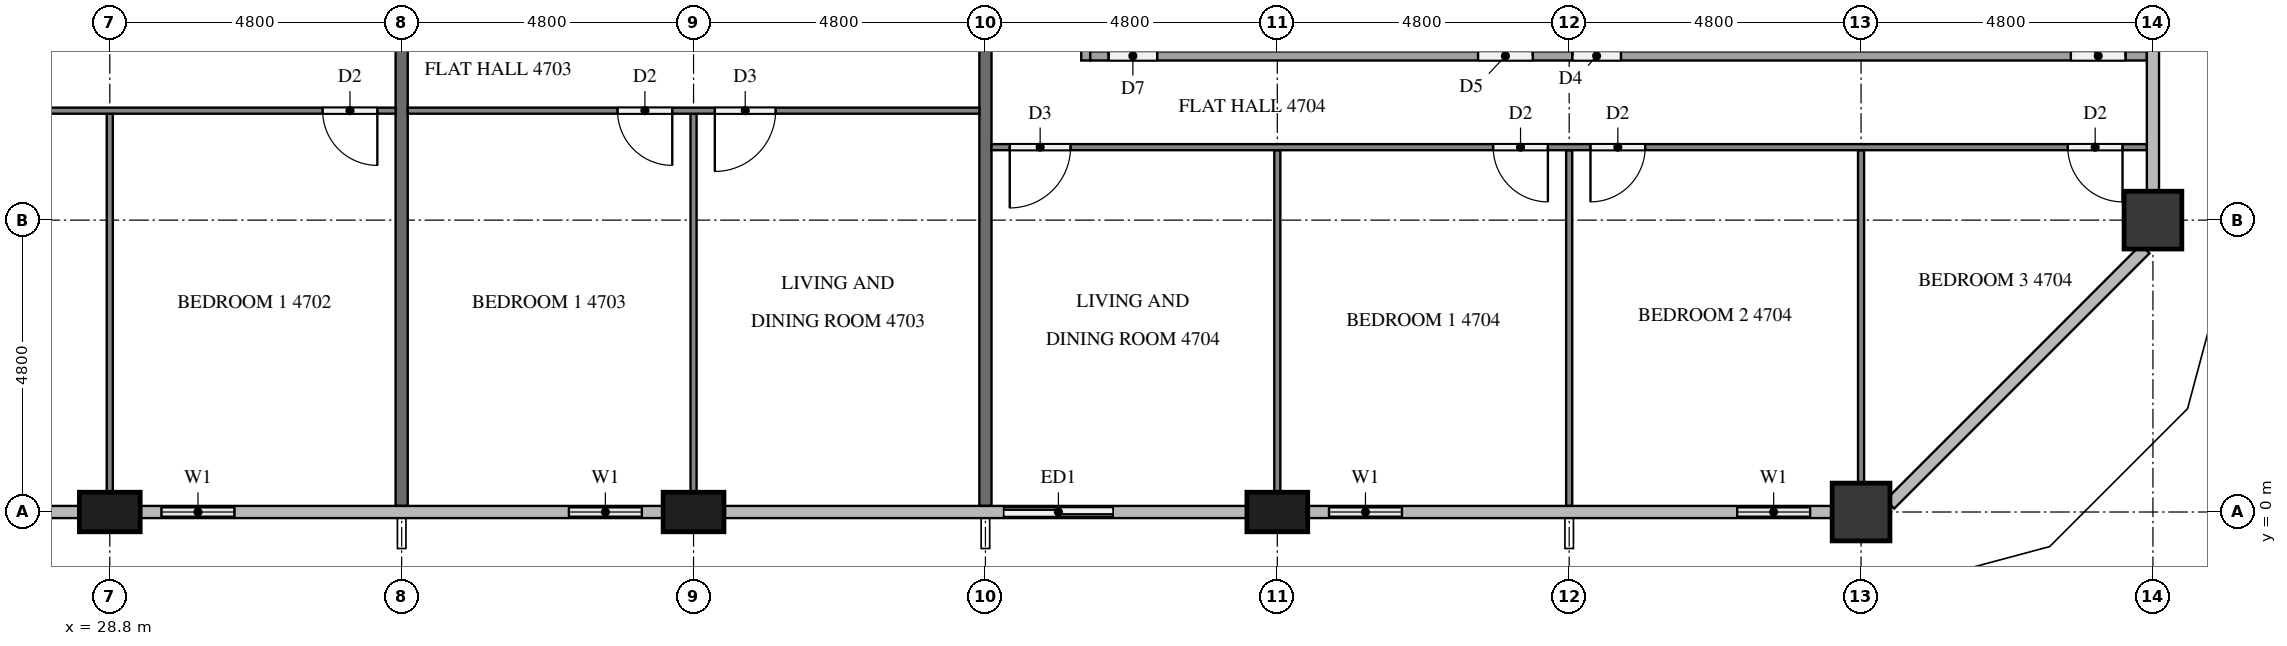
"""IFC4 building model, lengths in metres.
Left out: names, types, materials, properties, quantities, classifications, styles, units other than length and angle.
Written with IfcOpenShell. Run it as: python <this file> out.ifc"""

import sys

from ifc_helpers import new_model, si_unit, direction, frame, frame_2d, origin, origin_2d, place, context, subcontext, project, spatial, rectangle, extrude, element, fill, save


model = new_model("IFC4")
c1 = context("Model", 3, precision=1e-05, world=origin(), true_north=direction((0.0, 1.0)))
c2 = subcontext(c1, "Body", "Model", "MODEL_VIEW")
j1 = project(units=[si_unit("LENGTHUNIT", "METRE"), si_unit("PLANEANGLEUNIT", "RADIAN")], contexts=[c1])
p1 = place(None, origin())
s1 = spatial("IfcSite", under=j1, at=p1, CompositionType="ELEMENT")
p2 = place(p1, origin())
s2 = spatial("IfcBuilding", under=s1, at=p2, CompositionType="ELEMENT")
p3 = place(p2, frame((0.0, 0.0, 182.4)))
s3 = spatial("IfcBuildingStorey", under=s2, at=p3, CompositionType="ELEMENT", Elevation=182.4)
for number, where, z_axis, x_axis in (
    (1, (28.8, 0.0, 0.0), (0.0, 0.0, 1.0), (1.0, 0.0, 0.0)),
    (2, (38.4, 0.0, 0.0), (0.0, 0.0, 1.0), (1.0, 0.0, 0.0)),
    (3, (48.0, 0.0, 0.0), (0.0, 0.0, 1.0), (1.0, 0.0, 0.0)),
):
    element("IfcColumn", number, at=place(p3, frame(where, z_axis=z_axis, x_axis=x_axis)), inside=s3, PredefinedType="COLUMN", context=c2, shape_type="SweptSolid", body=[
        extrude(rectangle(XDim=1.0, YDim=0.65, at=origin_2d()), origin(), (0.0, 0.0, 1.0), 3.2),
    ])
for number, where, z_axis, x_axis in (
    (4, (57.6, 0.0, 0.0), (0.0, 0.0, 1.0), (1.0, 0.0, 0.0)),
    (5, (62.4, 4.8, 0.0), (0.0, 0.0, 1.0), (1.0, 0.0, 0.0)),
):
    element("IfcColumn", number, at=place(p3, frame(where, z_axis=z_axis, x_axis=x_axis)), inside=s3, PredefinedType="COLUMN", context=c2, shape_type="SweptSolid", body=[
        extrude(rectangle(XDim=0.95, YDim=0.95, at=origin_2d()), origin(), (0.0, 0.0, 1.0), 3.2),
    ])
p4 = place(p3, frame((29.3, 0.0, 0.0), z_axis=(0.0, 0.0, 1.0), x_axis=(1.0, 0.0, 0.0)))
e6 = element("IfcWall", 6, at=p4, inside=s3, PredefinedType="SOLIDWALL", context=c2, shape_type="SweptSolid", body=[
    extrude(rectangle(XDim=1.9, YDim=0.15, at=frame_2d((0.95, 0.0))), origin(), (0.0, 0.0, 1.0), 3.2),
])
p5 = place(p4, frame((0.35, 0.0, 0.9)))
e7 = element("IfcOpeningElement", 7, at=p5, cuts=e6, PredefinedType="OPENING", context=c2, shape_type="SweptSolid", body=[
    extrude(rectangle(XDim=1.2, YDim=1.4, at=frame_2d((0.6, 0.7))), frame((0.0, 0.085, 0.0), z_axis=(0.0, -1.0, 0.0), x_axis=(1.0, 0.0, 0.0)), (0.0, 0.0, 1.0), 0.17),
])
p6 = place(p3, frame((36.0, 0.0, 0.0), z_axis=(0.0, 0.0, 1.0), x_axis=(1.0, 0.0, 0.0)))
e8 = element("IfcWall", 8, at=p6, inside=s3, PredefinedType="SOLIDWALL", context=c2, shape_type="SweptSolid", body=[
    extrude(rectangle(XDim=1.9, YDim=0.15, at=frame_2d((0.95, 0.0))), origin(), (0.0, 0.0, 1.0), 3.2),
])
p7 = place(p6, frame((0.35, 0.0, 0.9)))
e9 = element("IfcOpeningElement", 9, at=p7, cuts=e8, PredefinedType="OPENING", context=c2, shape_type="SweptSolid", body=[
    extrude(rectangle(XDim=1.2, YDim=1.4, at=frame_2d((0.6, 0.7))), frame((0.0, 0.085, 0.0), z_axis=(0.0, -1.0, 0.0), x_axis=(1.0, 0.0, 0.0)), (0.0, 0.0, 1.0), 0.17),
])
p8 = place(p3, frame((43.2, 0.0, 0.0), z_axis=(0.0, 0.0, 1.0), x_axis=(1.0, 0.0, 0.0)))
e10 = element("IfcWall", 10, at=p8, inside=s3, PredefinedType="SOLIDWALL", context=c2, shape_type="SweptSolid", body=[
    extrude(rectangle(XDim=2.4, YDim=0.15, at=frame_2d((1.2, 0.0))), origin(), (0.0, 0.0, 1.0), 3.2),
])
p9 = place(p8, frame((0.3, 0.0, 0.0)))
e11 = element("IfcOpeningElement", 11, at=p9, cuts=e10, PredefinedType="OPENING", context=c2, shape_type="SweptSolid", body=[
    extrude(rectangle(XDim=1.8, YDim=2.4, at=frame_2d((0.9, 1.2))), frame((0.0, 0.085, 0.0), z_axis=(0.0, -1.0, 0.0), x_axis=(1.0, 0.0, 0.0)), (0.0, 0.0, 1.0), 0.17),
])
p10 = place(p3, frame((48.5, 0.0, 0.0), z_axis=(0.0, 0.0, 1.0), x_axis=(1.0, 0.0, 0.0)))
e12 = element("IfcWall", 12, at=p10, inside=s3, PredefinedType="SOLIDWALL", context=c2, shape_type="SweptSolid", body=[
    extrude(rectangle(XDim=1.9, YDim=0.15, at=frame_2d((0.95, 0.0))), origin(), (0.0, 0.0, 1.0), 3.2),
])
p11 = place(p10, frame((0.35, 0.0, 0.9)))
e13 = element("IfcOpeningElement", 13, at=p11, cuts=e12, PredefinedType="OPENING", context=c2, shape_type="SweptSolid", body=[
    extrude(rectangle(XDim=1.2, YDim=1.4, at=frame_2d((0.6, 0.7))), frame((0.0, 0.085, 0.0), z_axis=(0.0, -1.0, 0.0), x_axis=(1.0, 0.0, 0.0)), (0.0, 0.0, 1.0), 0.17),
])
p12 = place(p3, frame((55.2, 0.0, 0.0), z_axis=(0.0, 0.0, 1.0), x_axis=(1.0, 0.0, 0.0)))
e14 = element("IfcWall", 14, at=p12, inside=s3, PredefinedType="SOLIDWALL", context=c2, shape_type="SweptSolid", body=[
    extrude(rectangle(XDim=1.925, YDim=0.15, at=frame_2d((0.962, 0.0))), origin(), (0.0, 0.0, 1.0), 3.2),
])
p13 = place(p12, frame((0.363, 0.0, 0.9)))
e15 = element("IfcOpeningElement", 15, at=p13, cuts=e14, PredefinedType="OPENING", context=c2, shape_type="SweptSolid", body=[
    extrude(rectangle(XDim=1.2, YDim=1.4, at=frame_2d((0.6, 0.7))), frame((0.0, 0.085, 0.0), z_axis=(0.0, -1.0, 0.0), x_axis=(1.0, 0.0, 0.0)), (0.0, 0.0, 1.0), 0.17),
])
for number, where, z_axis, x_axis in (
    (16, (33.6, 11.9, 0.0), (0.0, 0.0, 1.0), (0.0, -1.0, 0.0)),
    (17, (43.2, 11.9, 0.0), (0.0, 0.0, 1.0), (0.0, -1.0, 0.0)),
):
    element("IfcWall", number, at=place(p3, frame(where, z_axis=z_axis, x_axis=x_axis)), inside=s3, PredefinedType="PARTITIONING", context=c2, shape_type="SweptSolid", body=[
        extrude(rectangle(XDim=11.8, YDim=0.2, at=frame_2d((5.9, 0.0))), origin(), (0.0, 0.0, 1.0), 3.2),
    ])
p14 = place(p3, frame((28.8, 6.55, 0.0), z_axis=(0.0, 0.0, 1.0), x_axis=(0.0, -1.0, 0.0)))
e18 = element("IfcWall", 18, at=p14, inside=s3, PredefinedType="PARTITIONING", context=c2, shape_type="SweptSolid", body=[
    extrude(rectangle(XDim=6.225, YDim=0.1, at=frame_2d((3.113, 0.0))), origin(), (0.0, 0.0, 1.0), 3.2),
])
p15 = place(p3, frame((33.5, 6.6, 0.0), z_axis=(0.0, 0.0, 1.0), x_axis=(-1.0, 0.0, 0.0)))
e19 = element("IfcWall", 19, at=p15, inside=s3, PredefinedType="PARTITIONING", context=c2, shape_type="SweptSolid", body=[
    extrude(rectangle(XDim=14.2, YDim=0.1, at=frame_2d((7.1, 0.0))), origin(), (0.0, 0.0, 1.0), 3.2),
])
p16 = place(p15, frame((0.3, 0.0, 0.0)))
e20 = element("IfcOpeningElement", 20, at=p16, cuts=e19, PredefinedType="OPENING", context=c2, shape_type="SweptSolid", body=[
    extrude(rectangle(XDim=0.9, YDim=2.1, at=frame_2d((0.45, 1.05))), frame((0.0, 0.06, 0.0), z_axis=(0.0, -1.0, 0.0), x_axis=(1.0, 0.0, 0.0)), (0.0, 0.0, 1.0), 0.12),
])
p17 = place(p15, frame((8.15, 0.0, 0.0)))
e21 = element("IfcOpeningElement", 21, at=p17, cuts=e19, PredefinedType="OPENING", context=c2, shape_type="SweptSolid", body=[
    extrude(rectangle(XDim=1.0, YDim=2.1, at=frame_2d((0.5, 1.05))), frame((0.0, 0.06, 0.0), z_axis=(0.0, -1.0, 0.0), x_axis=(1.0, 0.0, 0.0)), (0.0, 0.0, 1.0), 0.12),
])
p18 = place(p15, frame((9.85, 0.0, 0.0)))
e22 = element("IfcOpeningElement", 22, at=p18, cuts=e19, PredefinedType="OPENING", context=c2, shape_type="SweptSolid", body=[
    extrude(rectangle(XDim=0.9, YDim=2.1, at=frame_2d((0.45, 1.05))), frame((0.0, 0.06, 0.0), z_axis=(0.0, -1.0, 0.0), x_axis=(1.0, 0.0, 0.0)), (0.0, 0.0, 1.0), 0.12),
])
p19 = place(p3, frame((38.4, 6.55, 0.0), z_axis=(0.0, 0.0, 1.0), x_axis=(0.0, -1.0, 0.0)))
e23 = element("IfcWall", 23, at=p19, inside=s3, PredefinedType="PARTITIONING", context=c2, shape_type="SweptSolid", body=[
    extrude(rectangle(XDim=6.225, YDim=0.1, at=frame_2d((3.113, 0.0))), origin(), (0.0, 0.0, 1.0), 3.2),
])
p20 = place(p3, frame((43.1, 6.6, 0.0), z_axis=(0.0, 0.0, 1.0), x_axis=(-1.0, 0.0, 0.0)))
e24 = element("IfcWall", 24, at=p20, inside=s3, PredefinedType="PARTITIONING", context=c2, shape_type="SweptSolid", body=[
    extrude(rectangle(XDim=9.4, YDim=0.1, at=frame_2d((4.7, 0.0))), origin(), (0.0, 0.0, 1.0), 3.2),
])
p21 = place(p20, frame((3.35, 0.0, 0.0)))
e25 = element("IfcOpeningElement", 25, at=p21, cuts=e24, PredefinedType="OPENING", context=c2, shape_type="SweptSolid", body=[
    extrude(rectangle(XDim=1.0, YDim=2.1, at=frame_2d((0.5, 1.05))), frame((0.0, 0.06, 0.0), z_axis=(0.0, -1.0, 0.0), x_axis=(1.0, 0.0, 0.0)), (0.0, 0.0, 1.0), 0.12),
])
p22 = place(p20, frame((5.05, 0.0, 0.0)))
e26 = element("IfcOpeningElement", 26, at=p22, cuts=e24, PredefinedType="OPENING", context=c2, shape_type="SweptSolid", body=[
    extrude(rectangle(XDim=0.9, YDim=2.1, at=frame_2d((0.45, 1.05))), frame((0.0, 0.06, 0.0), z_axis=(0.0, -1.0, 0.0), x_axis=(1.0, 0.0, 0.0)), (0.0, 0.0, 1.0), 0.12),
])
p23 = place(p3, frame((48.0, 5.95, 0.0), z_axis=(0.0, 0.0, 1.0), x_axis=(0.0, -1.0, 0.0)))
e27 = element("IfcWall", 27, at=p23, inside=s3, PredefinedType="PARTITIONING", context=c2, shape_type="SweptSolid", body=[
    extrude(rectangle(XDim=5.625, YDim=0.1, at=frame_2d((2.812, 0.0))), origin(), (0.0, 0.0, 1.0), 3.2),
])
p24 = place(p3, frame((52.8, 5.95, 0.0), z_axis=(0.0, 0.0, 1.0), x_axis=(0.0, -1.0, 0.0)))
e28 = element("IfcWall", 28, at=p24, inside=s3, PredefinedType="PARTITIONING", context=c2, shape_type="SweptSolid", body=[
    extrude(rectangle(XDim=5.85, YDim=0.1, at=frame_2d((2.925, 0.0))), origin(), (0.0, 0.0, 1.0), 3.2),
])
p25 = place(p3, frame((57.6, 5.95, 0.0), z_axis=(0.0, 0.0, 1.0), x_axis=(0.0, -1.0, 0.0)))
e29 = element("IfcWall", 29, at=p25, inside=s3, PredefinedType="PARTITIONING", context=c2, shape_type="SweptSolid", body=[
    extrude(rectangle(XDim=5.475, YDim=0.1, at=frame_2d((2.737, 0.0))), origin(), (0.0, 0.0, 1.0), 3.2),
])
p26 = place(p3, frame((62.3, 6.0, 0.0), z_axis=(0.0, 0.0, 1.0), x_axis=(-1.0, 0.0, 0.0)))
e30 = element("IfcWall", 30, at=p26, inside=s3, PredefinedType="PARTITIONING", context=c2, shape_type="SweptSolid", body=[
    extrude(rectangle(XDim=19.0, YDim=0.1, at=frame_2d((9.5, 0.0))), origin(), (0.0, 0.0, 1.0), 3.2),
])
p27 = place(p26, frame((17.7, 0.0, 0.0)))
e31 = element("IfcOpeningElement", 31, at=p27, cuts=e30, PredefinedType="OPENING", context=c2, shape_type="SweptSolid", body=[
    extrude(rectangle(XDim=1.0, YDim=2.1, at=frame_2d((0.5, 1.05))), frame((0.0, 0.06, 0.0), z_axis=(0.0, -1.0, 0.0), x_axis=(1.0, 0.0, 0.0)), (0.0, 0.0, 1.0), 0.12),
])
p28 = place(p26, frame((9.85, 0.0, 0.0)))
e32 = element("IfcOpeningElement", 32, at=p28, cuts=e30, PredefinedType="OPENING", context=c2, shape_type="SweptSolid", body=[
    extrude(rectangle(XDim=0.9, YDim=2.1, at=frame_2d((0.45, 1.05))), frame((0.0, 0.06, 0.0), z_axis=(0.0, -1.0, 0.0), x_axis=(1.0, 0.0, 0.0)), (0.0, 0.0, 1.0), 0.12),
])
p29 = place(p26, frame((8.25, 0.0, 0.0)))
e33 = element("IfcOpeningElement", 33, at=p29, cuts=e30, PredefinedType="OPENING", context=c2, shape_type="SweptSolid", body=[
    extrude(rectangle(XDim=0.9, YDim=2.1, at=frame_2d((0.45, 1.05))), frame((0.0, 0.06, 0.0), z_axis=(0.0, -1.0, 0.0), x_axis=(1.0, 0.0, 0.0)), (0.0, 0.0, 1.0), 0.12),
])
p30 = place(p26, frame((0.4, 0.0, 0.0)))
e34 = element("IfcOpeningElement", 34, at=p30, cuts=e30, PredefinedType="OPENING", context=c2, shape_type="SweptSolid", body=[
    extrude(rectangle(XDim=0.9, YDim=2.1, at=frame_2d((0.45, 1.05))), frame((0.0, 0.06, 0.0), z_axis=(0.0, -1.0, 0.0), x_axis=(1.0, 0.0, 0.0)), (0.0, 0.0, 1.0), 0.12),
])
p31 = place(p3, frame((44.85, 11.9, 0.0), z_axis=(0.0, 0.0, 1.0), x_axis=(0.0, -1.0, 0.0)))
e35 = element("IfcWall", 35, at=p31, inside=s3, PredefinedType="PARTITIONING", context=c2, shape_type="SweptSolid", body=[
    extrude(rectangle(XDim=4.475, YDim=0.15, at=frame_2d((2.237, 0.0))), origin(), (0.0, 0.0, 1.0), 3.2),
])
p32 = place(p3, frame((44.925, 7.5, 0.0), z_axis=(0.0, 0.0, 1.0), x_axis=(1.0, 0.0, 0.0)))
e36 = element("IfcWall", 36, at=p32, inside=s3, PredefinedType="PARTITIONING", context=c2, shape_type="SweptSolid", body=[
    extrude(rectangle(XDim=17.375, YDim=0.15, at=frame_2d((8.688, 0.0))), origin(), (0.0, 0.0, 1.0), 3.2),
])
p33 = place(p32, frame((0.3, 0.0, 0.0)))
e37 = element("IfcOpeningElement", 37, at=p33, cuts=e36, PredefinedType="OPENING", context=c2, shape_type="SweptSolid", body=[
    extrude(rectangle(XDim=0.8, YDim=2.1, at=frame_2d((0.4, 1.05))), frame((0.0, 0.085, 0.0), z_axis=(0.0, -1.0, 0.0), x_axis=(1.0, 0.0, 0.0)), (0.0, 0.0, 1.0), 0.17),
])
p34 = place(p32, frame((6.377, 0.0, 0.0)))
e38 = element("IfcOpeningElement", 38, at=p34, cuts=e36, PredefinedType="OPENING", context=c2, shape_type="SweptSolid", body=[
    extrude(rectangle(XDim=0.9, YDim=2.1, at=frame_2d((0.45, 1.05))), frame((0.0, 0.085, 0.0), z_axis=(0.0, -1.0, 0.0), x_axis=(1.0, 0.0, 0.0)), (0.0, 0.0, 1.0), 0.17),
])
p35 = place(p32, frame((7.927, 0.0, 0.0)))
e39 = element("IfcOpeningElement", 39, at=p35, cuts=e36, PredefinedType="OPENING", context=c2, shape_type="SweptSolid", body=[
    extrude(rectangle(XDim=0.8, YDim=2.1, at=frame_2d((0.4, 1.05))), frame((0.0, 0.085, 0.0), z_axis=(0.0, -1.0, 0.0), x_axis=(1.0, 0.0, 0.0)), (0.0, 0.0, 1.0), 0.17),
])
p36 = place(p32, frame((16.125, 0.0, 0.0)))
e40 = element("IfcOpeningElement", 40, at=p36, cuts=e36, PredefinedType="OPENING", context=c2, shape_type="SweptSolid", body=[
    extrude(rectangle(XDim=0.9, YDim=2.1, at=frame_2d((0.45, 1.05))), frame((0.0, 0.085, 0.0), z_axis=(0.0, -1.0, 0.0), x_axis=(1.0, 0.0, 0.0)), (0.0, 0.0, 1.0), 0.17),
])
p37 = place(p5, origin())
e41 = element("IfcWindow", 41, at=p37, inside=s3, PartitioningType="SINGLE_PANEL", PredefinedType="WINDOW", context=c2, shape_type="SweptSolid", body=[
    extrude(rectangle(XDim=1.2, YDim=1.4, at=frame_2d((0.6, 0.7))), frame((0.0, 0.03, 0.0), z_axis=(0.0, -1.0, 0.0), x_axis=(1.0, 0.0, 0.0)), (0.0, 0.0, 1.0), 0.06),
])
fill(e7, e41)
p38 = place(p7, origin())
e42 = element("IfcWindow", 42, at=p38, inside=s3, PartitioningType="SINGLE_PANEL", PredefinedType="WINDOW", context=c2, shape_type="SweptSolid", body=[
    extrude(rectangle(XDim=1.2, YDim=1.4, at=frame_2d((0.6, 0.7))), frame((0.0, 0.03, 0.0), z_axis=(0.0, -1.0, 0.0), x_axis=(1.0, 0.0, 0.0)), (0.0, 0.0, 1.0), 0.06),
])
fill(e9, e42)
p39 = place(p9, origin())
e43 = element("IfcDoor", 43, at=p39, inside=s3, OperationType="SLIDING_TO_LEFT", PredefinedType="DOOR", context=c2, shape_type="SweptSolid", body=[
    extrude(rectangle(XDim=1.8, YDim=2.4, at=frame_2d((0.9, 1.2))), frame((0.0, 0.025, 0.0), z_axis=(0.0, -1.0, 0.0), x_axis=(1.0, 0.0, 0.0)), (0.0, 0.0, 1.0), 0.05),
])
fill(e11, e43)
p40 = place(p11, origin())
e44 = element("IfcWindow", 44, at=p40, inside=s3, PartitioningType="SINGLE_PANEL", PredefinedType="WINDOW", context=c2, shape_type="SweptSolid", body=[
    extrude(rectangle(XDim=1.2, YDim=1.4, at=frame_2d((0.6, 0.7))), frame((0.0, 0.03, 0.0), z_axis=(0.0, -1.0, 0.0), x_axis=(1.0, 0.0, 0.0)), (0.0, 0.0, 1.0), 0.06),
])
fill(e13, e44)
p41 = place(p13, origin())
e45 = element("IfcWindow", 45, at=p41, inside=s3, PartitioningType="SINGLE_PANEL", PredefinedType="WINDOW", context=c2, shape_type="SweptSolid", body=[
    extrude(rectangle(XDim=1.2, YDim=1.4, at=frame_2d((0.6, 0.7))), frame((0.0, 0.03, 0.0), z_axis=(0.0, -1.0, 0.0), x_axis=(1.0, 0.0, 0.0)), (0.0, 0.0, 1.0), 0.06),
])
fill(e15, e45)
p42 = place(p16, origin())
e46 = element("IfcDoor", 46, at=p42, inside=s3, OperationType="SINGLE_SWING_LEFT", PredefinedType="DOOR", context=c2, shape_type="SweptSolid", body=[
    extrude(rectangle(XDim=0.9, YDim=2.1, at=frame_2d((0.45, 1.05))), frame((0.0, 0.025, 0.0), z_axis=(0.0, -1.0, 0.0), x_axis=(1.0, 0.0, 0.0)), (0.0, 0.0, 1.0), 0.05),
])
fill(e20, e46)
p43 = place(p21, origin())
e47 = element("IfcDoor", 47, at=p43, inside=s3, OperationType="SINGLE_SWING_RIGHT", PredefinedType="DOOR", context=c2, shape_type="SweptSolid", body=[
    extrude(rectangle(XDim=1.0, YDim=2.1, at=frame_2d((0.5, 1.05))), frame((0.0, 0.025, 0.0), z_axis=(0.0, -1.0, 0.0), x_axis=(1.0, 0.0, 0.0)), (0.0, 0.0, 1.0), 0.05),
])
fill(e25, e47)
p44 = place(p22, origin())
e48 = element("IfcDoor", 48, at=p44, inside=s3, OperationType="SINGLE_SWING_LEFT", PredefinedType="DOOR", context=c2, shape_type="SweptSolid", body=[
    extrude(rectangle(XDim=0.9, YDim=2.1, at=frame_2d((0.45, 1.05))), frame((0.0, 0.025, 0.0), z_axis=(0.0, -1.0, 0.0), x_axis=(1.0, 0.0, 0.0)), (0.0, 0.0, 1.0), 0.05),
])
fill(e26, e48)
p45 = place(p27, origin())
e49 = element("IfcDoor", 49, at=p45, inside=s3, OperationType="SINGLE_SWING_RIGHT", PredefinedType="DOOR", context=c2, shape_type="SweptSolid", body=[
    extrude(rectangle(XDim=1.0, YDim=2.1, at=frame_2d((0.5, 1.05))), frame((0.0, 0.025, 0.0), z_axis=(0.0, -1.0, 0.0), x_axis=(1.0, 0.0, 0.0)), (0.0, 0.0, 1.0), 0.05),
])
fill(e31, e49)
p46 = place(p28, origin())
e50 = element("IfcDoor", 50, at=p46, inside=s3, OperationType="SINGLE_SWING_LEFT", PredefinedType="DOOR", context=c2, shape_type="SweptSolid", body=[
    extrude(rectangle(XDim=0.9, YDim=2.1, at=frame_2d((0.45, 1.05))), frame((0.0, 0.025, 0.0), z_axis=(0.0, -1.0, 0.0), x_axis=(1.0, 0.0, 0.0)), (0.0, 0.0, 1.0), 0.05),
])
fill(e32, e50)
p47 = place(p29, origin())
e51 = element("IfcDoor", 51, at=p47, inside=s3, OperationType="SINGLE_SWING_RIGHT", PredefinedType="DOOR", context=c2, shape_type="SweptSolid", body=[
    extrude(rectangle(XDim=0.9, YDim=2.1, at=frame_2d((0.45, 1.05))), frame((0.0, 0.025, 0.0), z_axis=(0.0, -1.0, 0.0), x_axis=(1.0, 0.0, 0.0)), (0.0, 0.0, 1.0), 0.05),
])
fill(e33, e51)
p48 = place(p30, origin())
e52 = element("IfcDoor", 52, at=p48, inside=s3, OperationType="SINGLE_SWING_LEFT", PredefinedType="DOOR", context=c2, shape_type="SweptSolid", body=[
    extrude(rectangle(XDim=0.9, YDim=2.1, at=frame_2d((0.45, 1.05))), frame((0.0, 0.025, 0.0), z_axis=(0.0, -1.0, 0.0), x_axis=(1.0, 0.0, 0.0)), (0.0, 0.0, 1.0), 0.05),
])
fill(e34, e52)
p49 = place(p33, origin())
e53 = element("IfcDoor", 53, at=p49, inside=s3, OperationType="SINGLE_SWING_LEFT", PredefinedType="DOOR", context=c2, shape_type="SweptSolid", body=[
    extrude(rectangle(XDim=0.8, YDim=2.1, at=frame_2d((0.4, 1.05))), frame((0.0, 0.025, 0.0), z_axis=(0.0, -1.0, 0.0), x_axis=(1.0, 0.0, 0.0)), (0.0, 0.0, 1.0), 0.05),
])
fill(e37, e53)
p50 = place(p34, origin())
e54 = element("IfcDoor", 54, at=p50, inside=s3, OperationType="SINGLE_SWING_RIGHT", PredefinedType="DOOR", context=c2, shape_type="SweptSolid", body=[
    extrude(rectangle(XDim=0.9, YDim=2.1, at=frame_2d((0.45, 1.05))), frame((0.0, 0.025, 0.0), z_axis=(0.0, -1.0, 0.0), x_axis=(1.0, 0.0, 0.0)), (0.0, 0.0, 1.0), 0.05),
])
fill(e38, e54)
p51 = place(p35, origin())
e55 = element("IfcDoor", 55, at=p51, inside=s3, OperationType="SINGLE_SWING_LEFT", PredefinedType="DOOR", context=c2, shape_type="SweptSolid", body=[
    extrude(rectangle(XDim=0.8, YDim=2.1, at=frame_2d((0.4, 1.05))), frame((0.0, 0.025, 0.0), z_axis=(0.0, -1.0, 0.0), x_axis=(1.0, 0.0, 0.0)), (0.0, 0.0, 1.0), 0.05),
])
fill(e39, e55)
p52 = place(p36, origin())
e56 = element("IfcDoor", 56, at=p52, inside=s3, OperationType="SINGLE_SWING_RIGHT", PredefinedType="DOOR", context=c2, shape_type="SweptSolid", body=[
    extrude(rectangle(XDim=0.9, YDim=2.1, at=frame_2d((0.45, 1.05))), frame((0.0, 0.025, 0.0), z_axis=(0.0, -1.0, 0.0), x_axis=(1.0, 0.0, 0.0)), (0.0, 0.0, 1.0), 0.05),
])
fill(e40, e56)
save(model, sys.argv[1])
